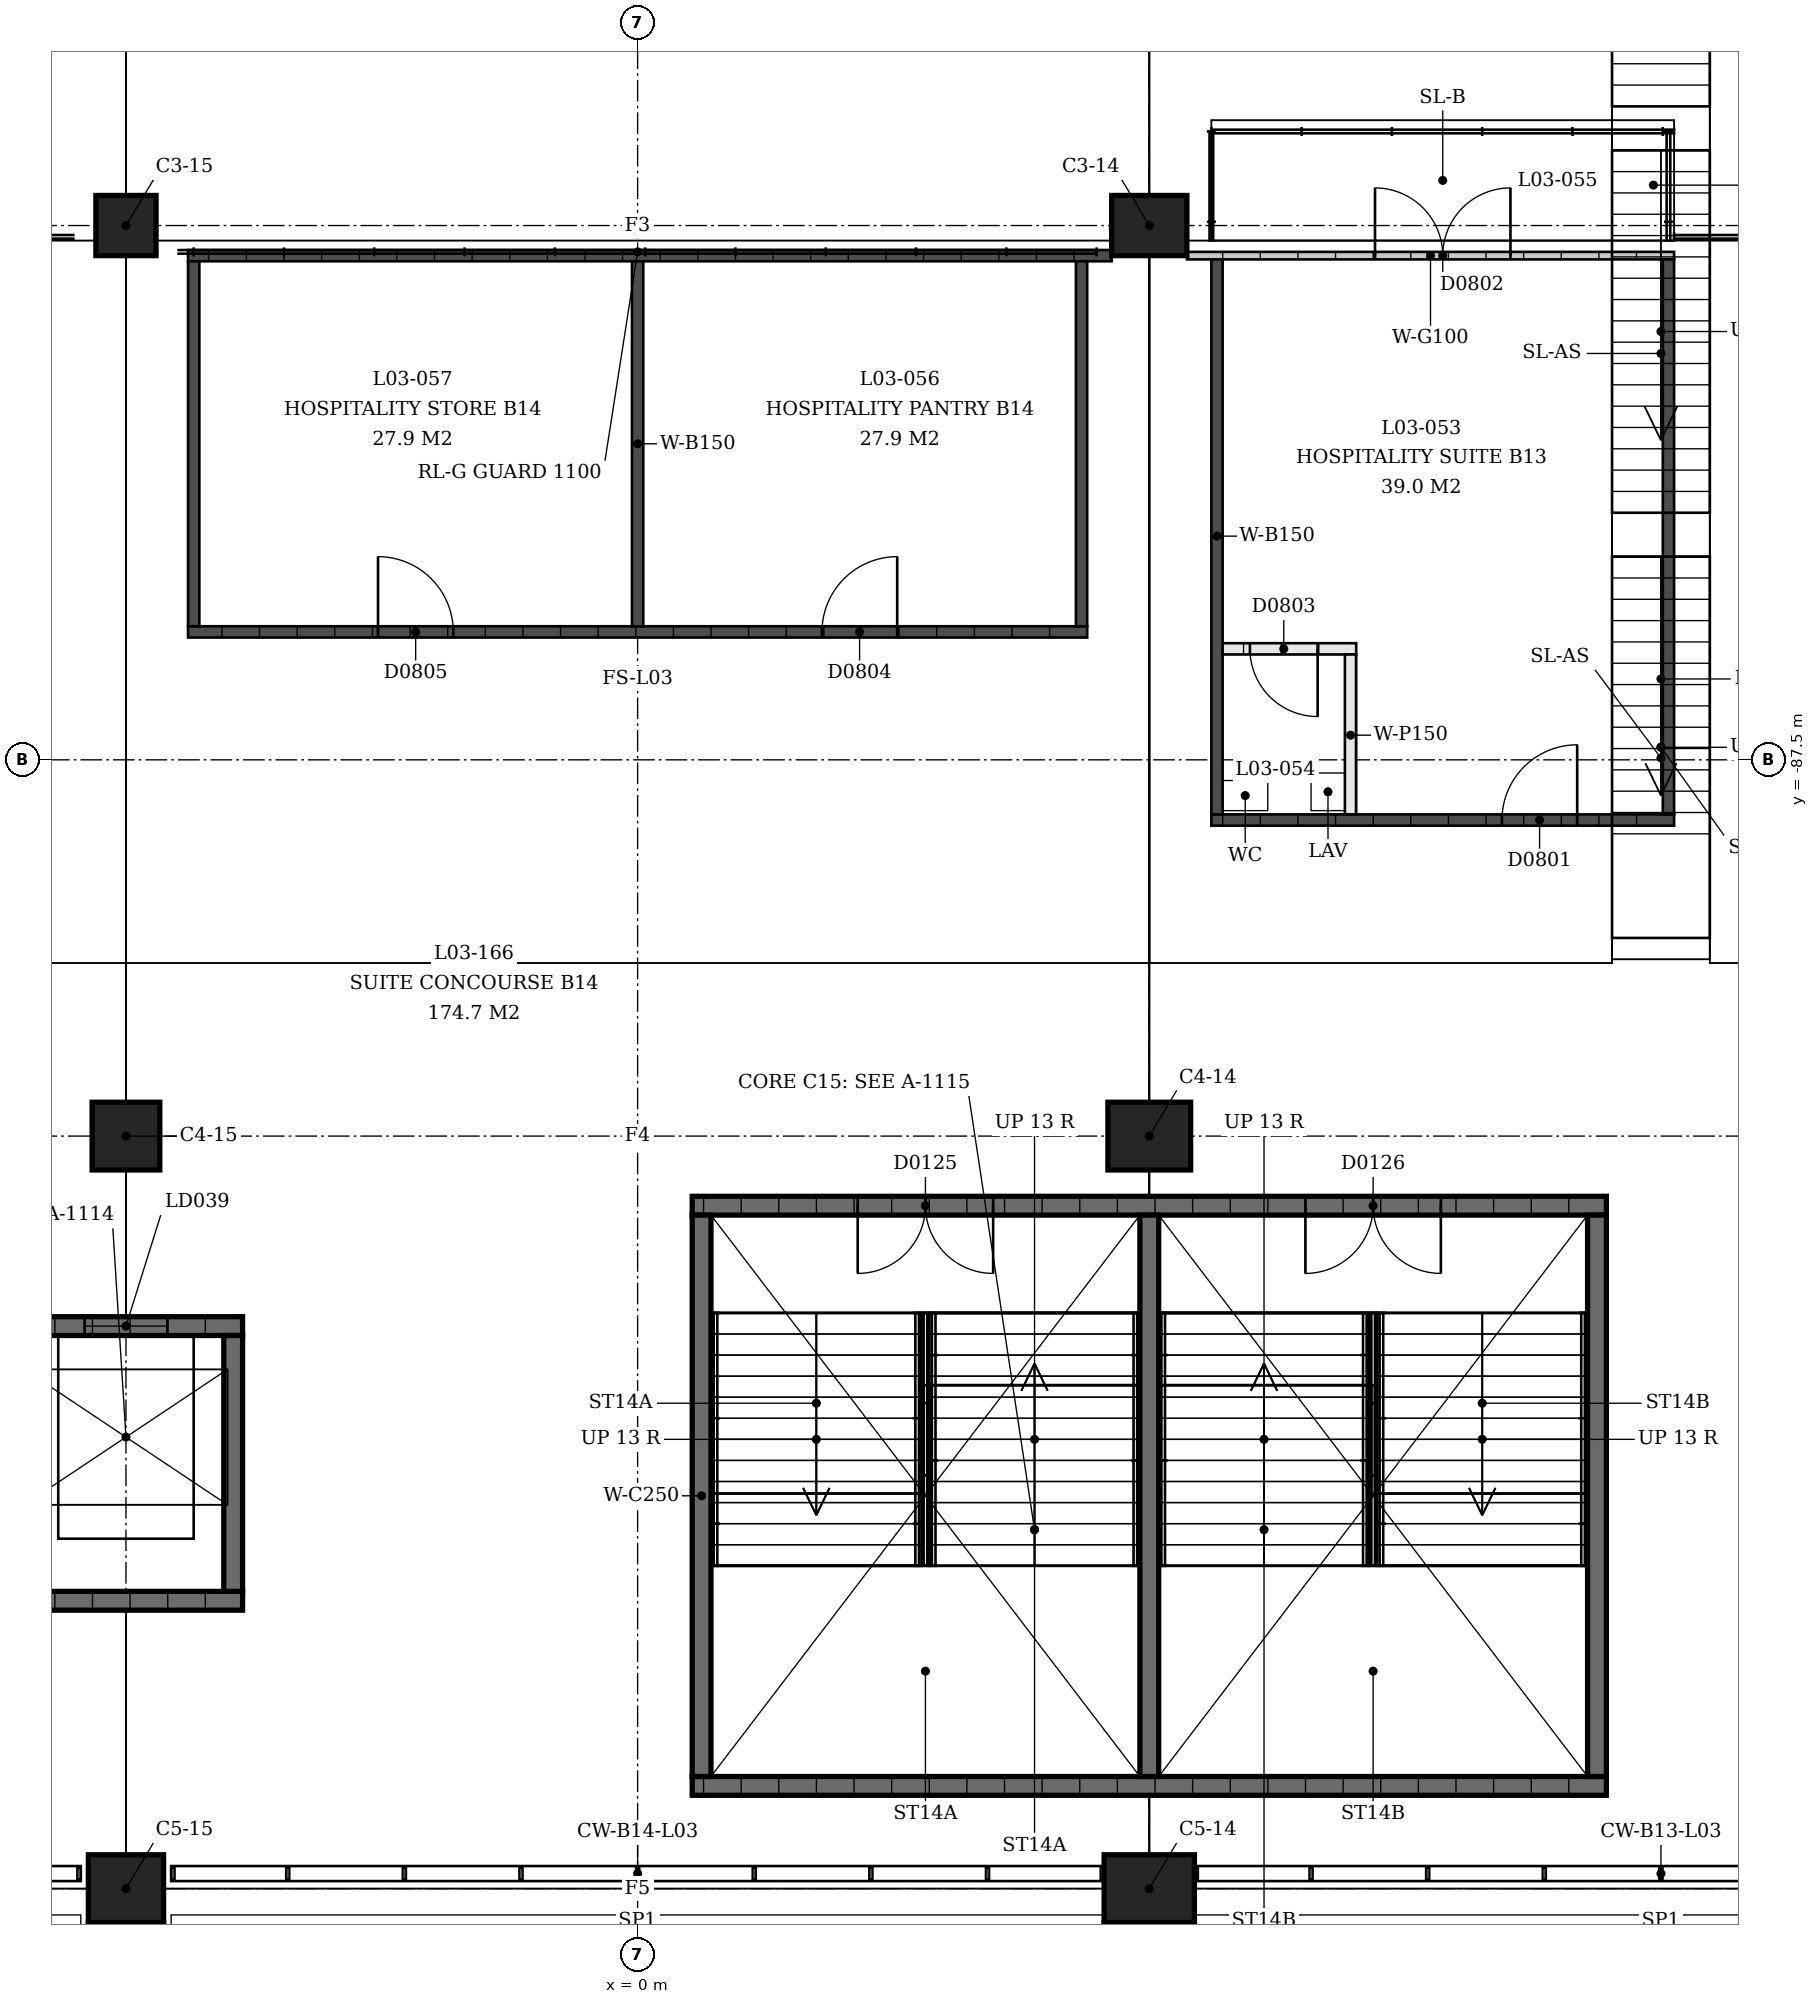
"""IFC4 building model, lengths in metres.
Left out: names, types, materials, properties, quantities, classifications, styles, units other than length and angle.
Written with IfcOpenShell. Run it as: python <this file> out.ifc"""

import sys

from ifc_helpers import new_model, si_unit, direction, frame, frame_2d, origin, origin_2d, place, context, subcontext, project, spatial, rectangle, extrude, element, fill, save


model = new_model("IFC4")
c1 = context("Model", 3, precision=1e-05, world=origin(), true_north=direction((0.0, 1.0)))
c2 = subcontext(c1, "Body", "Model", "MODEL_VIEW")
j1 = project(units=[si_unit("LENGTHUNIT", "METRE"), si_unit("PLANEANGLEUNIT", "RADIAN")], contexts=[c1])
p1 = place(None, origin())
s1 = spatial("IfcSite", under=j1, at=p1, CompositionType="ELEMENT")
p2 = place(p1, origin())
s2 = spatial("IfcBuilding", under=s1, at=p2, CompositionType="ELEMENT")
p3 = place(p2, frame((0.0, 0.0, 13.5)))
s3 = spatial("IfcBuildingStorey", under=s2, at=p3, CompositionType="ELEMENT", Elevation=13.5)
p4 = place(p3, frame((6.8, -80.4, 0.0), z_axis=(0.0, 0.0, 1.0), x_axis=(1.0, 0.0, 0.0)))
e1 = element("IfcColumn", 1, at=p4, inside=s3, PredefinedType="COLUMN", context=c2, shape_type="SweptSolid", body=[
    extrude(rectangle(XDim=1.0, YDim=0.8, at=origin_2d()), origin(), (0.0, 0.0, 1.0), 2.033),
])
p5 = place(p3, frame((6.8, -92.5, 0.0), z_axis=(0.0, 0.0, 1.0), x_axis=(1.0, 0.0, 0.0)))
e2 = element("IfcColumn", 2, at=p5, inside=s3, PredefinedType="COLUMN", context=c2, shape_type="SweptSolid", body=[
    extrude(rectangle(XDim=1.1, YDim=0.9, at=origin_2d()), origin(), (0.0, 0.0, 1.0), 4.5),
])
p6 = place(p3, frame((6.8, -102.5, 0.0), z_axis=(0.0, 0.0, 1.0), x_axis=(1.0, 0.0, 0.0)))
e3 = element("IfcColumn", 3, at=p6, inside=s3, PredefinedType="COLUMN", context=c2, shape_type="SweptSolid", body=[
    extrude(rectangle(XDim=1.2, YDim=0.9, at=origin_2d()), origin(), (0.0, 0.0, 1.0), 4.5),
])
p7 = place(p3, frame((-6.8, -80.4, 0.0), z_axis=(0.0, 0.0, 1.0), x_axis=(1.0, 0.0, 0.0)))
e4 = element("IfcColumn", 4, at=p7, inside=s3, PredefinedType="COLUMN", context=c2, shape_type="SweptSolid", body=[
    extrude(rectangle(XDim=0.8, YDim=0.8, at=origin_2d()), origin(), (0.0, 0.0, 1.0), 2.033),
])
p8 = place(p3, frame((-6.8, -92.5, 0.0), z_axis=(0.0, 0.0, 1.0), x_axis=(1.0, 0.0, 0.0)))
e5 = element("IfcColumn", 5, at=p8, inside=s3, PredefinedType="COLUMN", context=c2, shape_type="SweptSolid", body=[
    extrude(rectangle(XDim=0.9, YDim=0.9, at=origin_2d()), origin(), (0.0, 0.0, 1.0), 4.5),
])
p9 = place(p3, frame((-6.8, -102.5, 0.0), z_axis=(0.0, 0.0, 1.0), x_axis=(1.0, 0.0, 0.0)))
e6 = element("IfcColumn", 6, at=p9, inside=s3, PredefinedType="COLUMN", context=c2, shape_type="SweptSolid", body=[
    extrude(rectangle(XDim=1.0, YDim=0.9, at=origin_2d()), origin(), (0.0, 0.0, 1.0), 4.5),
])
p10 = place(p3, frame((0.725, -93.425, 0.0), z_axis=(0.0, 0.0, 1.0), x_axis=(1.0, 0.0, 0.0)))
e7 = element("IfcWall", 7, at=p10, inside=s3, PredefinedType="SHEAR", context=c2, shape_type="SweptSolid", body=[
    extrude(rectangle(XDim=12.15, YDim=0.25, at=frame_2d((6.075, 0.0))), origin(), (0.0, 0.0, 1.0), 4.09),
])
p11 = place(p10, frame((2.2, 0.0, 0.0)))
e8 = element("IfcOpeningElement", 8, at=p11, cuts=e7, PredefinedType="OPENING", context=c2, shape_type="SweptSolid", body=[
    extrude(rectangle(XDim=1.8, YDim=2.1, at=frame_2d((0.9, 1.05))), frame((0.0, 0.125, 0.0), z_axis=(0.0, -1.0, 0.0), x_axis=(1.0, 0.0, 0.0)), (0.0, 0.0, 1.0), 0.25),
])
p12 = place(p10, frame((8.15, 0.0, 0.0)))
e9 = element("IfcOpeningElement", 9, at=p12, cuts=e7, PredefinedType="OPENING", context=c2, shape_type="SweptSolid", body=[
    extrude(rectangle(XDim=1.8, YDim=2.1, at=frame_2d((0.9, 1.05))), frame((0.0, 0.125, 0.0), z_axis=(0.0, -1.0, 0.0), x_axis=(1.0, 0.0, 0.0)), (0.0, 0.0, 1.0), 0.25),
])
p13 = place(p3, frame((0.725, -101.135, 0.0), z_axis=(0.0, 0.0, 1.0), x_axis=(1.0, 0.0, 0.0)))
e10 = element("IfcWall", 10, at=p13, inside=s3, PredefinedType="SHEAR", context=c2, shape_type="SweptSolid", body=[
    extrude(rectangle(XDim=12.15, YDim=0.25, at=frame_2d((6.075, 0.0))), origin(), (0.0, 0.0, 1.0), 4.09),
])
for number, where, z_axis, x_axis in (
    (11, (0.85, -93.55, 0.0), (0.0, 0.0, 1.0), (0.0, -1.0, 0.0)),
    (12, (12.75, -93.55, 0.0), (0.0, 0.0, 1.0), (0.0, -1.0, 0.0)),
    (13, (6.8, -93.55, 0.0), (0.0, 0.0, 1.0), (0.0, -1.0, 0.0)),
):
    element("IfcWall", number, at=place(p3, frame(where, z_axis=z_axis, x_axis=x_axis)), inside=s3, PredefinedType="SHEAR", context=c2, shape_type="SweptSolid", body=[
        extrude(rectangle(XDim=7.46, YDim=0.25, at=frame_2d((3.73, 0.0))), origin(), (0.0, 0.0, 1.0), 4.09),
    ])
p14 = place(p3, frame((-8.35, -95.025, 0.0), z_axis=(0.0, 0.0, 1.0), x_axis=(1.0, 0.0, 0.0)))
e14 = element("IfcWall", 14, at=p14, inside=s3, PredefinedType="SHEAR", context=c2, shape_type="SweptSolid", body=[
    extrude(rectangle(XDim=3.1, YDim=0.25, at=frame_2d((1.55, 0.0))), origin(), (0.0, 0.0, 1.0), 4.09),
])
p15 = place(p14, frame((1.0, 0.0, 0.0)))
e15 = element("IfcOpeningElement", 15, at=p15, cuts=e14, PredefinedType="OPENING", context=c2, shape_type="SweptSolid", body=[
    extrude(rectangle(XDim=1.1, YDim=2.1, at=frame_2d((0.55, 1.05))), frame((0.0, 0.125, 0.0), z_axis=(0.0, -1.0, 0.0), x_axis=(1.0, 0.0, 0.0)), (0.0, 0.0, 1.0), 0.25),
])
p16 = place(p3, frame((-8.35, -98.675, 0.0), z_axis=(0.0, 0.0, 1.0), x_axis=(1.0, 0.0, 0.0)))
e16 = element("IfcWall", 16, at=p16, inside=s3, PredefinedType="SHEAR", context=c2, shape_type="SweptSolid", body=[
    extrude(rectangle(XDim=3.1, YDim=0.25, at=frame_2d((1.55, 0.0))), origin(), (0.0, 0.0, 1.0), 4.09),
])
p17 = place(p3, frame((-5.375, -95.15, 0.0), z_axis=(0.0, 0.0, 1.0), x_axis=(0.0, -1.0, 0.0)))
e17 = element("IfcWall", 17, at=p17, inside=s3, PredefinedType="SHEAR", context=c2, shape_type="SweptSolid", body=[
    extrude(rectangle(XDim=3.4, YDim=0.25, at=frame_2d((1.7, 0.0))), origin(), (0.0, 0.0, 1.0), 4.09),
])
p18 = place(p3, frame((7.3, -80.8, 0.0), z_axis=(0.0, 0.0, 1.0), x_axis=(1.0, 0.0, 0.0)))
e18 = element("IfcWall", 18, at=p18, inside=s3, PredefinedType="PARTITIONING", context=c2, shape_type="SweptSolid", body=[
    extrude(rectangle(XDim=6.475, YDim=0.1, at=frame_2d((3.237, 0.0))), origin(), (0.0, 0.0, 1.0), 3.0),
])
p19 = place(p18, frame((2.5, 0.0, 0.0)))
e19 = element("IfcOpeningElement", 19, at=p19, cuts=e18, PredefinedType="OPENING", context=c2, shape_type="SweptSolid", body=[
    extrude(rectangle(XDim=1.8, YDim=2.1, at=frame_2d((0.9, 1.05))), frame((0.0, 0.05, 0.0), z_axis=(0.0, -1.0, 0.0), x_axis=(1.0, 0.0, 0.0)), (0.0, 0.0, 1.0), 0.1),
])
p20 = place(p3, frame((7.625, -88.3, 0.0), z_axis=(0.0, 0.0, 1.0), x_axis=(1.0, 0.0, 0.0)))
e20 = element("IfcWall", 20, at=p20, inside=s3, PredefinedType="SOLIDWALL", context=c2, shape_type="SweptSolid", body=[
    extrude(rectangle(XDim=6.15, YDim=0.15, at=frame_2d((3.075, 0.0))), origin(), (0.0, 0.0, 1.0), 3.0),
])
p21 = place(p20, frame((3.862, 0.0, 0.0)))
e21 = element("IfcOpeningElement", 21, at=p21, cuts=e20, PredefinedType="OPENING", context=c2, shape_type="SweptSolid", body=[
    extrude(rectangle(XDim=1.0, YDim=2.1, at=frame_2d((0.5, 1.05))), frame((0.0, 0.075, 0.0), z_axis=(0.0, -1.0, 0.0), x_axis=(1.0, 0.0, 0.0)), (0.0, 0.0, 1.0), 0.15),
])
for number, where, z_axis, x_axis in (
    (22, (7.7, -80.85, 0.0), (0.0, 0.0, 1.0), (0.0, -1.0, 0.0)),
    (23, (13.7, -80.85, 0.0), (0.0, 0.0, 1.0), (0.0, -1.0, 0.0)),
):
    element("IfcWall", number, at=place(p3, frame(where, z_axis=z_axis, x_axis=x_axis)), inside=s3, PredefinedType="SOLIDWALL", context=c2, shape_type="SweptSolid", body=[
        extrude(rectangle(XDim=7.375, YDim=0.15, at=frame_2d((3.688, 0.0))), origin(), (0.0, 0.0, 1.0), 3.0),
    ])
p22 = place(p3, frame((7.775, -86.025, 0.0), z_axis=(0.0, 0.0, 1.0), x_axis=(1.0, 0.0, 0.0)))
e24 = element("IfcWall", 24, at=p22, inside=s3, PredefinedType="PARTITIONING", context=c2, shape_type="SweptSolid", body=[
    extrude(rectangle(XDim=1.775, YDim=0.15, at=frame_2d((0.888, 0.0))), origin(), (0.0, 0.0, 1.0), 3.0),
])
p23 = place(p22, frame((0.363, 0.0, 0.0)))
e25 = element("IfcOpeningElement", 25, at=p23, cuts=e24, PredefinedType="OPENING", context=c2, shape_type="SweptSolid", body=[
    extrude(rectangle(XDim=0.9, YDim=2.1, at=frame_2d((0.45, 1.05))), frame((0.0, 0.075, 0.0), z_axis=(0.0, -1.0, 0.0), x_axis=(1.0, 0.0, 0.0)), (0.0, 0.0, 1.0), 0.15),
])
p24 = place(p3, frame((9.475, -86.1, 0.0), z_axis=(0.0, 0.0, 1.0), x_axis=(0.0, -1.0, 0.0)))
e26 = element("IfcWall", 26, at=p24, inside=s3, PredefinedType="PARTITIONING", context=c2, shape_type="SweptSolid", body=[
    extrude(rectangle(XDim=2.125, YDim=0.15, at=frame_2d((1.062, 0.0))), origin(), (0.0, 0.0, 1.0), 3.0),
])
p25 = place(p3, frame((6.3, -80.8, 0.0), z_axis=(0.0, 0.0, 1.0), x_axis=(-1.0, 0.0, 0.0)))
e27 = element("IfcWall", 27, at=p25, inside=s3, PredefinedType="SOLIDWALL", context=c2, shape_type="SweptSolid", body=[
    extrude(rectangle(XDim=12.275, YDim=0.15, at=frame_2d((6.138, 0.0))), origin(), (0.0, 0.0, 1.0), 3.0),
])
p26 = place(p3, frame((5.975, -85.8, 0.0), z_axis=(0.0, 0.0, 1.0), x_axis=(-1.0, 0.0, 0.0)))
e28 = element("IfcWall", 28, at=p26, inside=s3, PredefinedType="SOLIDWALL", context=c2, shape_type="SweptSolid", body=[
    extrude(rectangle(XDim=11.95, YDim=0.15, at=frame_2d((5.975, 0.0))), origin(), (0.0, 0.0, 1.0), 3.0),
])
p27 = place(p26, frame((2.525, 0.0, 0.0)))
e29 = element("IfcOpeningElement", 29, at=p27, cuts=e28, PredefinedType="OPENING", context=c2, shape_type="SweptSolid", body=[
    extrude(rectangle(XDim=1.0, YDim=2.1, at=frame_2d((0.5, 1.05))), frame((0.0, 0.075, 0.0), z_axis=(0.0, -1.0, 0.0), x_axis=(1.0, 0.0, 0.0)), (0.0, 0.0, 1.0), 0.15),
])
p28 = place(p26, frame((8.425, 0.0, 0.0)))
e30 = element("IfcOpeningElement", 30, at=p28, cuts=e28, PredefinedType="OPENING", context=c2, shape_type="SweptSolid", body=[
    extrude(rectangle(XDim=1.0, YDim=2.1, at=frame_2d((0.5, 1.05))), frame((0.0, 0.075, 0.0), z_axis=(0.0, -1.0, 0.0), x_axis=(1.0, 0.0, 0.0)), (0.0, 0.0, 1.0), 0.15),
])
for number, where, z_axis, x_axis in (
    (31, (5.9, -80.875, 0.0), (0.0, 0.0, 1.0), (0.0, -1.0, 0.0)),
    (32, (0.0, -80.875, 0.0), (0.0, 0.0, 1.0), (0.0, -1.0, 0.0)),
    (33, (-5.9, -80.875, 0.0), (0.0, 0.0, 1.0), (0.0, -1.0, 0.0)),
):
    element("IfcWall", number, at=place(p3, frame(where, z_axis=z_axis, x_axis=x_axis)), inside=s3, PredefinedType="SOLIDWALL", context=c2, shape_type="SweptSolid", body=[
        extrude(rectangle(XDim=4.85, YDim=0.15, at=frame_2d((2.425, 0.0))), origin(), (0.0, 0.0, 1.0), 3.0),
    ])
p29 = place(p11, origin())
e34 = element("IfcDoor", 34, at=p29, inside=s3, OperationType="DOUBLE_DOOR_SINGLE_SWING", PredefinedType="DOOR", context=c2, shape_type="SweptSolid", body=[
    extrude(rectangle(XDim=1.8, YDim=2.1, at=frame_2d((0.9, 1.05))), frame((0.0, 0.025, 0.0), z_axis=(0.0, -1.0, 0.0), x_axis=(1.0, 0.0, 0.0)), (0.0, 0.0, 1.0), 0.05),
])
fill(e8, e34)
p30 = place(p12, origin())
e35 = element("IfcDoor", 35, at=p30, inside=s3, OperationType="DOUBLE_DOOR_SINGLE_SWING", PredefinedType="DOOR", context=c2, shape_type="SweptSolid", body=[
    extrude(rectangle(XDim=1.8, YDim=2.1, at=frame_2d((0.9, 1.05))), frame((0.0, 0.025, 0.0), z_axis=(0.0, -1.0, 0.0), x_axis=(1.0, 0.0, 0.0)), (0.0, 0.0, 1.0), 0.05),
])
fill(e9, e35)
p31 = place(p15, origin())
e36 = element("IfcDoor", 36, at=p31, inside=s3, OperationType="SLIDING_TO_LEFT", PredefinedType="DOOR", context=c2, shape_type="SweptSolid", body=[
    extrude(rectangle(XDim=1.1, YDim=2.1, at=frame_2d((0.55, 1.05))), frame((0.0, 0.025, 0.0), z_axis=(0.0, -1.0, 0.0), x_axis=(1.0, 0.0, 0.0)), (0.0, 0.0, 1.0), 0.05),
])
fill(e15, e36)
p32 = place(p21, origin())
e37 = element("IfcDoor", 37, at=p32, inside=s3, OperationType="SINGLE_SWING_LEFT", PredefinedType="DOOR", context=c2, shape_type="SweptSolid", body=[
    extrude(rectangle(XDim=1.0, YDim=2.1, at=frame_2d((0.5, 1.05))), frame((0.0, 0.025, 0.0), z_axis=(0.0, -1.0, 0.0), x_axis=(1.0, 0.0, 0.0)), (0.0, 0.0, 1.0), 0.05),
])
fill(e21, e37)
p33 = place(p19, origin())
e38 = element("IfcDoor", 38, at=p33, inside=s3, OperationType="DOUBLE_DOOR_SINGLE_SWING", PredefinedType="DOOR", context=c2, shape_type="SweptSolid", body=[
    extrude(rectangle(XDim=1.8, YDim=2.1, at=frame_2d((0.9, 1.05))), frame((0.0, 0.025, 0.0), z_axis=(0.0, -1.0, 0.0), x_axis=(1.0, 0.0, 0.0)), (0.0, 0.0, 1.0), 0.05),
])
fill(e19, e38)
p34 = place(p23, origin())
e39 = element("IfcDoor", 39, at=p34, inside=s3, OperationType="SINGLE_SWING_RIGHT", PredefinedType="DOOR", context=c2, shape_type="SweptSolid", body=[
    extrude(rectangle(XDim=0.9, YDim=2.1, at=frame_2d((0.45, 1.05))), frame((0.0, 0.025, 0.0), z_axis=(0.0, -1.0, 0.0), x_axis=(1.0, 0.0, 0.0)), (0.0, 0.0, 1.0), 0.05),
])
fill(e25, e39)
p35 = place(p27, origin())
e40 = element("IfcDoor", 40, at=p35, inside=s3, OperationType="SINGLE_SWING_LEFT", PredefinedType="DOOR", context=c2, shape_type="SweptSolid", body=[
    extrude(rectangle(XDim=1.0, YDim=2.1, at=frame_2d((0.5, 1.05))), frame((0.0, 0.025, 0.0), z_axis=(0.0, -1.0, 0.0), x_axis=(1.0, 0.0, 0.0)), (0.0, 0.0, 1.0), 0.05),
])
fill(e29, e40)
p36 = place(p28, origin())
e41 = element("IfcDoor", 41, at=p36, inside=s3, OperationType="SINGLE_SWING_RIGHT", PredefinedType="DOOR", context=c2, shape_type="SweptSolid", body=[
    extrude(rectangle(XDim=1.0, YDim=2.1, at=frame_2d((0.5, 1.05))), frame((0.0, 0.025, 0.0), z_axis=(0.0, -1.0, 0.0), x_axis=(1.0, 0.0, 0.0)), (0.0, 0.0, 1.0), 0.05),
])
fill(e30, e41)
save(model, sys.argv[1])
